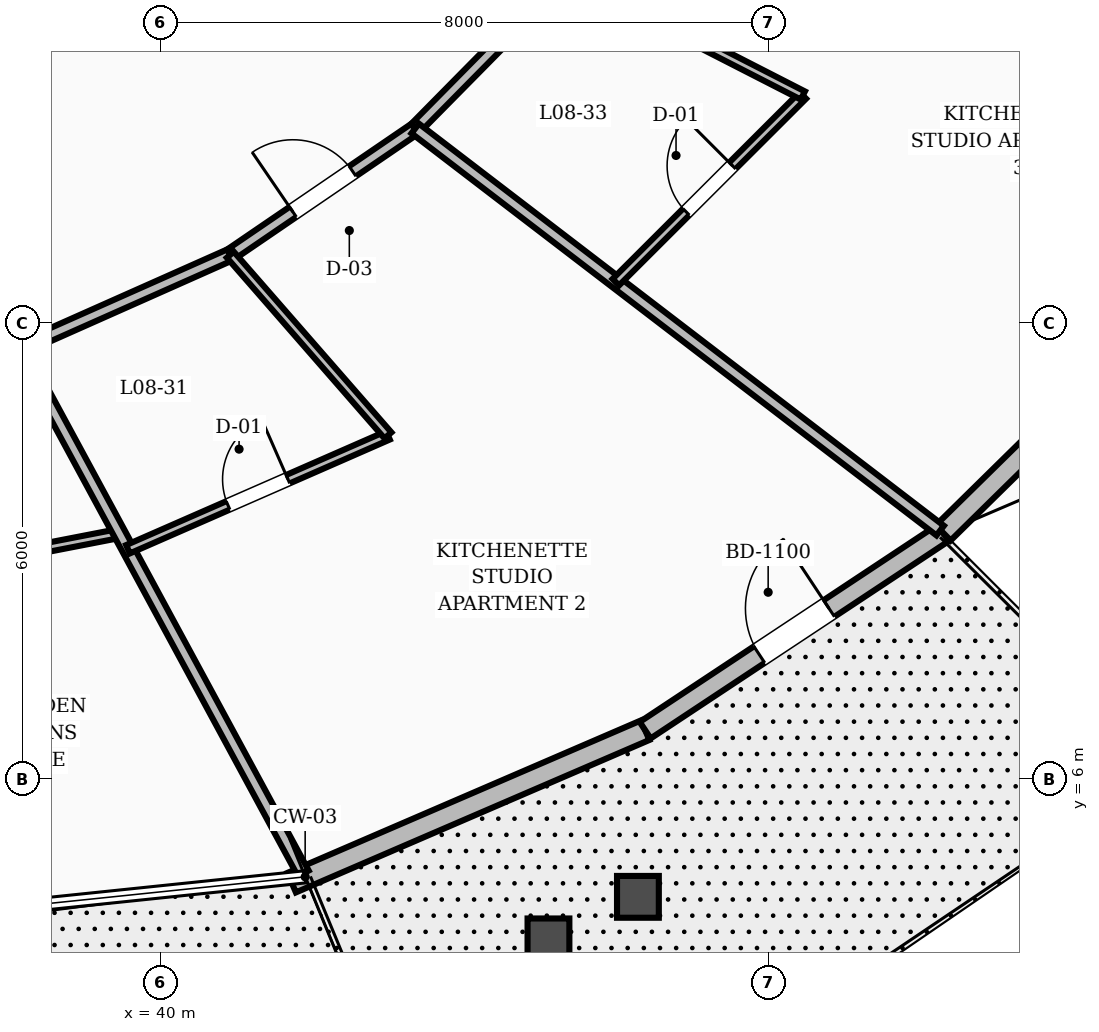
"""IFC4 building model, lengths in metres.
Left out: names, types, materials, properties, quantities, classifications, styles, units other than length and angle.
Written with IfcOpenShell. Run it as: python <this file> out.ifc"""

import sys

from ifc_helpers import new_model, si_unit, direction, frame, frame_2d, origin, place, context, subcontext, project, spatial, rectangle, extrude, element, fill, save


model = new_model("IFC4")
c1 = context("Model", 3, precision=1e-05, world=origin(), true_north=direction((0.0, 1.0)))
c2 = subcontext(c1, "Body", "Model", "MODEL_VIEW")
j1 = project(units=[si_unit("LENGTHUNIT", "METRE"), si_unit("PLANEANGLEUNIT", "RADIAN")], contexts=[c1])
p1 = place(None, origin())
s1 = spatial("IfcSite", under=j1, at=p1, CompositionType="ELEMENT")
p2 = place(p1, origin())
s2 = spatial("IfcBuilding", under=s1, at=p2, CompositionType="ELEMENT")
p3 = place(p2, frame((0.0, 0.0, 37.6)))
s3 = spatial("IfcBuildingStorey", under=s2, at=p3, CompositionType="ELEMENT", Elevation=37.6)
p4 = place(p3, frame((41.724, 4.639, 0.0), z_axis=(0.0, 0.0, 1.0), x_axis=(0.91826758141, 0.395960413339, 0.0)))
e1 = element("IfcWall", 1, at=p4, inside=s3, PredefinedType="STANDARD", context=c2, shape_type="SweptSolid", body=[
    extrude(rectangle(XDim=5.064, YDim=0.28, at=frame_2d((2.532, 0.0))), origin(), (0.0, 0.0, 1.0), 2.65),
])
p5 = place(p3, frame((46.375, 6.644, 0.0), z_axis=(0.0, 0.0, 1.0), x_axis=(0.833795486972, 0.552073442492, 0.0)))
e2 = element("IfcWall", 2, at=p5, inside=s3, PredefinedType="STANDARD", context=c2, shape_type="SweptSolid", body=[
    extrude(rectangle(XDim=4.702, YDim=0.26, at=frame_2d((2.351, 0.0))), origin(), (0.0, 0.0, 1.0), 2.65),
])
p6 = place(p5, frame((1.801, 0.0, 0.0)))
e3 = element("IfcOpeningElement", 3, at=p6, cuts=e2, PredefinedType="OPENING", context=c2, shape_type="SweptSolid", body=[
    extrude(rectangle(XDim=1.1, YDim=2.15, at=frame_2d((0.55, 1.075))), frame((0.0, 0.14, 0.0), z_axis=(0.0, -1.0, 0.0), x_axis=(1.0, 0.0, 0.0)), (0.0, 0.0, 1.0), 0.28),
])
p7 = place(p3, frame((50.295, 9.24, 0.0), z_axis=(0.0, 0.0, 1.0), x_axis=(0.713140886871, 0.701020738262, 0.0)))
e4 = element("IfcWall", 4, at=p7, inside=s3, PredefinedType="STANDARD", context=c2, shape_type="SweptSolid", body=[
    extrude(rectangle(XDim=4.512, YDim=0.28, at=frame_2d((2.256, 0.0))), origin(), (0.0, 0.0, 1.0), 2.65),
])
p8 = place(p3, frame((38.142, 11.666, 0.0), z_axis=(0.0, 0.0, 1.0), x_axis=(0.913768445178, 0.406235434936, 0.0)))
e5 = element("IfcWall", 5, at=p8, inside=s3, PredefinedType="SOLIDWALL", context=c2, shape_type="SweptSolid", body=[
    extrude(rectangle(XDim=3.037, YDim=0.16, at=frame_2d((1.519, 0.0))), origin(), (0.0, 0.0, 1.0), 2.61),
])
p9 = place(p3, frame((40.917, 12.9, 0.0), z_axis=(0.0, 0.0, 1.0), x_axis=(0.825929039072, 0.563774088104, 0.0)))
e6 = element("IfcWall", 6, at=p9, inside=s3, PredefinedType="SOLIDWALL", context=c2, shape_type="SweptSolid", body=[
    extrude(rectangle(XDim=2.945, YDim=0.16, at=frame_2d((1.472, 0.0))), origin(), (0.0, 0.0, 1.0), 2.61),
])
p10 = place(p9, frame((0.997, 0.0, 0.0)))
e7 = element("IfcOpeningElement", 7, at=p10, cuts=e6, PredefinedType="OPENING", context=c2, shape_type="SweptSolid", body=[
    extrude(rectangle(XDim=0.95, YDim=2.1, at=frame_2d((0.475, 1.05))), frame((0.0, 0.09, 0.0), z_axis=(0.0, -1.0, 0.0), x_axis=(1.0, 0.0, 0.0)), (0.0, 0.0, 1.0), 0.18),
])
p11 = place(p3, frame((43.349, 14.56, 0.0), z_axis=(0.0, 0.0, 1.0), x_axis=(0.702366174226, 0.711815816981, 0.0)))
e8 = element("IfcWall", 8, at=p11, inside=s3, PredefinedType="SOLIDWALL", context=c2, shape_type="SweptSolid", body=[
    extrude(rectangle(XDim=2.842, YDim=0.16, at=frame_2d((1.421, 0.0))), origin(), (0.0, 0.0, 1.0), 2.61),
])
p12 = place(p3, frame((35.764, 8.516, 0.0), z_axis=(0.0, 0.0, 1.0), x_axis=(0.981665665995, 0.190610913138, 0.0)))
e9 = element("IfcWall", 9, at=p12, inside=s3, PredefinedType="PARTITIONING", context=c2, shape_type="SweptSolid", body=[
    extrude(rectangle(XDim=3.763, YDim=0.12, at=frame_2d((1.882, 0.0))), origin(), (0.0, 0.0, 1.0), 2.61),
])
p13 = place(p3, frame((38.142, 11.666, 0.0), z_axis=(0.0, 0.0, 1.0), x_axis=(0.475710154332, -0.879602097011, 0.0)))
e10 = element("IfcWall", 10, at=p13, inside=s3, PredefinedType="SOLIDWALL", context=c2, shape_type="SweptSolid", body=[
    extrude(rectangle(XDim=7.853, YDim=0.16, at=frame_2d((3.926, 0.0))), origin(), (0.0, 0.0, 1.0), 2.61),
])
p14 = place(p3, frame((39.571, 9.025, 0.0), z_axis=(0.0, 0.0, 1.0), x_axis=(0.916011707184, 0.401151532841, 0.0)))
e11 = element("IfcWall", 11, at=p14, inside=s3, PredefinedType="PARTITIONING", context=c2, shape_type="SweptSolid", body=[
    extrude(rectangle(XDim=3.734, YDim=0.12, at=frame_2d((1.867, 0.0))), origin(), (0.0, 0.0, 1.0), 2.61),
])
p15 = place(p14, frame((1.437, 0.0, 0.0)))
e12 = element("IfcOpeningElement", 12, at=p15, cuts=e11, PredefinedType="OPENING", context=c2, shape_type="SweptSolid", body=[
    extrude(rectangle(XDim=0.86, YDim=2.1, at=frame_2d((0.43, 1.05))), frame((0.0, 0.07, 0.0), z_axis=(0.0, -1.0, 0.0), x_axis=(1.0, 0.0, 0.0)), (0.0, 0.0, 1.0), 0.14),
])
p16 = place(p3, frame((40.917, 12.9, 0.0), z_axis=(0.0, 0.0, 1.0), x_axis=(0.657413632061, -0.753529904105, 0.0)))
e13 = element("IfcWall", 13, at=p16, inside=s3, PredefinedType="PARTITIONING", context=c2, shape_type="SweptSolid", body=[
    extrude(rectangle(XDim=3.155, YDim=0.12, at=frame_2d((1.577, 0.0))), origin(), (0.0, 0.0, 1.0), 2.61),
])
p17 = place(p3, frame((43.349, 14.56, 0.0), z_axis=(0.0, 0.0, 1.0), x_axis=(0.793917921688, -0.608024944902, 0.0)))
e14 = element("IfcWall", 14, at=p17, inside=s3, PredefinedType="SOLIDWALL", context=c2, shape_type="SweptSolid", body=[
    extrude(rectangle(XDim=8.699, YDim=0.16, at=frame_2d((4.35, 0.0))), origin(), (0.0, 0.0, 1.0), 2.61),
])
p18 = place(p3, frame((45.989, 12.539, 0.0), z_axis=(0.0, 0.0, 1.0), x_axis=(0.707703480641, 0.706509577776, 0.0)))
e15 = element("IfcWall", 15, at=p18, inside=s3, PredefinedType="PARTITIONING", context=c2, shape_type="SweptSolid", body=[
    extrude(rectangle(XDim=3.476, YDim=0.12, at=frame_2d((1.738, 0.0))), origin(), (0.0, 0.0, 1.0), 2.61),
])
p19 = place(p18, frame((1.308, 0.0, 0.0)))
e16 = element("IfcOpeningElement", 16, at=p19, cuts=e15, PredefinedType="OPENING", context=c2, shape_type="SweptSolid", body=[
    extrude(rectangle(XDim=0.86, YDim=2.1, at=frame_2d((0.43, 1.05))), frame((0.0, 0.07, 0.0), z_axis=(0.0, -1.0, 0.0), x_axis=(1.0, 0.0, 0.0)), (0.0, 0.0, 1.0), 0.14),
])
p20 = place(p3, frame((45.345, 16.583, 0.0), z_axis=(0.0, 0.0, 1.0), x_axis=(0.890200615817, -0.455568725439, 0.0)))
e17 = element("IfcWall", 17, at=p20, inside=s3, PredefinedType="PARTITIONING", context=c2, shape_type="SweptSolid", body=[
    extrude(rectangle(XDim=3.487, YDim=0.12, at=frame_2d((1.743, 0.0))), origin(), (0.0, 0.0, 1.0), 2.61),
])
p21 = place(p6, origin())
e18 = element("IfcDoor", 18, at=p21, inside=s3, OperationType="SINGLE_SWING_RIGHT", PredefinedType="DOOR", context=c2, shape_type="SweptSolid", body=[
    extrude(rectangle(XDim=1.1, YDim=2.15, at=frame_2d((0.55, 1.075))), frame((0.0, 0.025, 0.0), z_axis=(0.0, -1.0, 0.0), x_axis=(1.0, 0.0, 0.0)), (0.0, 0.0, 1.0), 0.05),
])
fill(e3, e18)
p22 = place(p15, origin())
e19 = element("IfcDoor", 19, at=p22, inside=s3, OperationType="SINGLE_SWING_RIGHT", PredefinedType="DOOR", context=c2, shape_type="SweptSolid", body=[
    extrude(rectangle(XDim=0.86, YDim=2.1, at=frame_2d((0.43, 1.05))), frame((0.0, 0.025, 0.0), z_axis=(0.0, -1.0, 0.0), x_axis=(1.0, 0.0, 0.0)), (0.0, 0.0, 1.0), 0.05),
])
fill(e12, e19)
p23 = place(p10, origin())
e20 = element("IfcDoor", 20, at=p23, inside=s3, OperationType="SINGLE_SWING_LEFT", PredefinedType="DOOR", context=c2, shape_type="SweptSolid", body=[
    extrude(rectangle(XDim=0.95, YDim=2.1, at=frame_2d((0.475, 1.05))), frame((0.0, 0.025, 0.0), z_axis=(0.0, -1.0, 0.0), x_axis=(1.0, 0.0, 0.0)), (0.0, 0.0, 1.0), 0.05),
])
fill(e7, e20)
p24 = place(p19, origin())
e21 = element("IfcDoor", 21, at=p24, inside=s3, OperationType="SINGLE_SWING_RIGHT", PredefinedType="DOOR", context=c2, shape_type="SweptSolid", body=[
    extrude(rectangle(XDim=0.86, YDim=2.1, at=frame_2d((0.43, 1.05))), frame((0.0, 0.025, 0.0), z_axis=(0.0, -1.0, 0.0), x_axis=(1.0, 0.0, 0.0)), (0.0, 0.0, 1.0), 0.05),
])
fill(e16, e21)
save(model, sys.argv[1])
